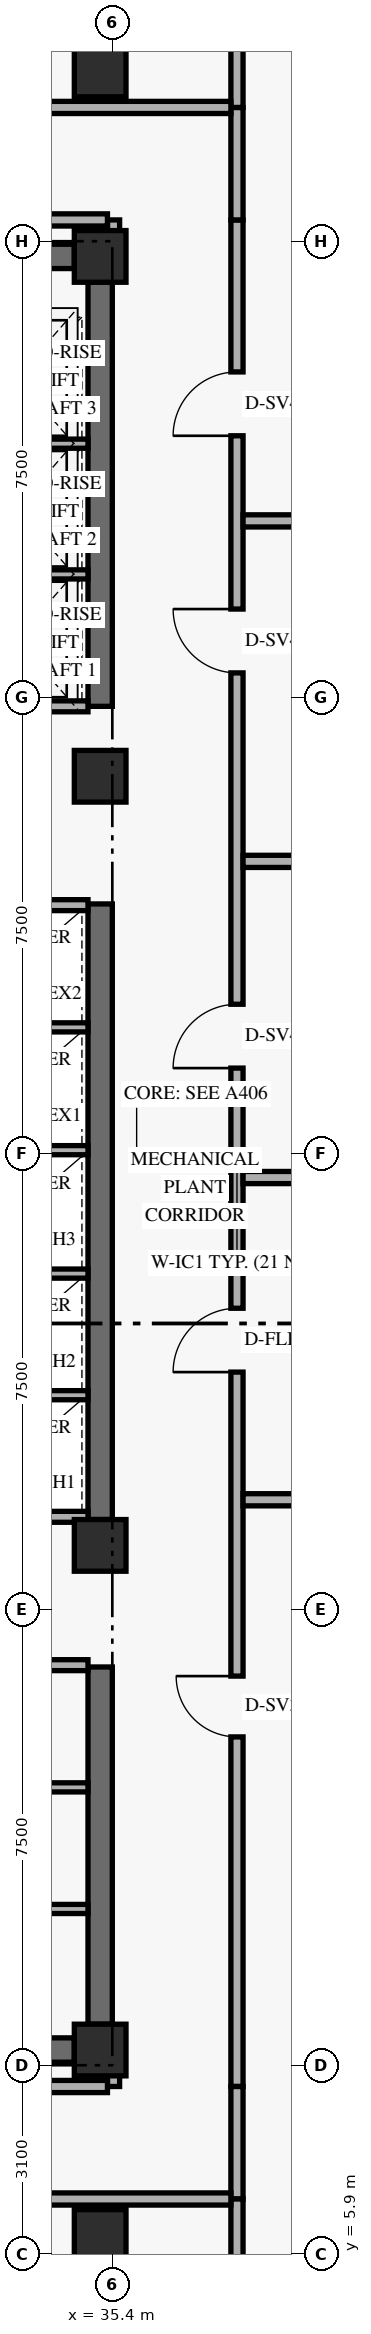
"""IFC4 building model, lengths in metres.
Left out: names, types, materials, properties, quantities, classifications, styles, units other than length and angle.
Written with IfcOpenShell. Run it as: python <this file> out.ifc"""

import sys

from ifc_helpers import new_model, si_unit, direction, frame, frame_2d, origin, origin_2d, place, context, subcontext, project, spatial, rectangle, extrude, element, fill, save


model = new_model("IFC4")
c1 = context("Model", 3, precision=1e-05, world=origin(), true_north=direction((0.0, 1.0)))
c2 = subcontext(c1, "Body", "Model", "MODEL_VIEW")
j1 = project(units=[si_unit("LENGTHUNIT", "METRE"), si_unit("PLANEANGLEUNIT", "RADIAN")], contexts=[c1])
p1 = place(None, origin())
s1 = spatial("IfcSite", under=j1, at=p1, CompositionType="ELEMENT")
p2 = place(p1, origin())
s2 = spatial("IfcBuilding", under=s1, at=p2, CompositionType="ELEMENT")
p3 = place(p2, frame((0.0, 0.0, 135.6)))
s3 = spatial("IfcBuildingStorey", under=s2, at=p3, CompositionType="ELEMENT", Elevation=135.6)
p4 = place(p3, frame((35.2, 9.675, 0.0), z_axis=(0.0, 0.0, 1.0), x_axis=(0.0, 1.0, 0.0)))
e1 = element("IfcWall", 1, at=p4, inside=s3, PredefinedType="SHEAR", context=c2, shape_type="SweptSolid", body=[
    extrude(rectangle(XDim=5.875, YDim=0.4, at=frame_2d((2.938, 0.0))), origin(), (0.0, 0.0, 1.0), 4.549),
])
p5 = place(p3, frame((35.2, 17.975, 0.0), z_axis=(0.0, 0.0, 1.0), x_axis=(0.0, 1.0, 0.0)))
e2 = element("IfcWall", 2, at=p5, inside=s3, PredefinedType="SHEAR", context=c2, shape_type="SweptSolid", body=[
    extrude(rectangle(XDim=10.125, YDim=0.4, at=frame_2d((5.062, 0.0))), origin(), (0.0, 0.0, 1.0), 4.549),
])
p6 = place(p3, frame((35.2, 31.35, 0.0), z_axis=(0.0, 0.0, 1.0), x_axis=(0.0, 1.0, 0.0)))
e3 = element("IfcWall", 3, at=p6, inside=s3, PredefinedType="SHEAR", context=c2, shape_type="SweptSolid", body=[
    extrude(rectangle(XDim=6.975, YDim=0.4, at=frame_2d((3.487, 0.0))), origin(), (0.0, 0.0, 1.0), 4.549),
])
for number, where, z_axis, x_axis in (
    (4, (24.625, 9.25, 0.0), (0.0, 0.0, 1.0), (1.0, 0.0, 0.0)),
    (5, (24.625, 38.75, 0.0), (0.0, 0.0, 1.0), (1.0, 0.0, 0.0)),
):
    element("IfcWall", number, at=place(p3, frame(where, z_axis=z_axis, x_axis=x_axis)), inside=s3, PredefinedType="SHEAR", context=c2, shape_type="SweptSolid", body=[
        extrude(rectangle(XDim=10.15, YDim=0.4, at=frame_2d((5.075, 0.0))), origin(), (0.0, 0.0, 1.0), 5.16),
    ])
for number, where, z_axis, x_axis in (
    (6, (35.2, 6.2, 0.0), (0.0, 0.0, 1.0), (1.0, 0.0, 0.0)),
    (7, (35.2, 9.25, 0.0), (0.0, 0.0, 1.0), (1.0, 0.0, 0.0)),
    (8, (35.2, 17.55, 0.0), (0.0, 0.0, 1.0), (1.0, 0.0, 0.0)),
    (9, (35.2, 30.2, 0.0), (0.0, 0.0, 1.0), (1.0, 0.0, 0.0)),
    (10, (35.2, 38.75, 0.0), (0.0, 0.0, 1.0), (1.0, 0.0, 0.0)),
    (11, (35.2, 41.8, 0.0), (0.0, 0.0, 1.0), (1.0, 0.0, 0.0)),
):
    element("IfcColumn", number, at=place(p3, frame(where, z_axis=z_axis, x_axis=x_axis)), inside=s3, PredefinedType="COLUMN", context=c2, shape_type="SweptSolid", body=[
        extrude(rectangle(XDim=0.85, YDim=0.85, at=origin_2d()), origin(), (0.0, 0.0, 1.0), 5.4),
    ])
p7 = place(p3, frame((32.74, 15.58, 0.0), z_axis=(0.0, 0.0, 1.0), x_axis=(1.0, 0.0, 0.0)))
e12 = element("IfcWall", 12, at=p7, inside=s3, PredefinedType="STANDARD", context=c2, shape_type="SweptSolid", body=[
    extrude(rectangle(XDim=2.26, YDim=0.18, at=frame_2d((1.13, 0.0))), origin(), (0.0, 0.0, 1.0), 5.16),
])
for number, where, z_axis, x_axis in (
    (13, (32.74, 11.57, 0.0), (0.0, 0.0, 1.0), (1.0, 0.0, 0.0)),
    (14, (32.74, 13.57, 0.0), (0.0, 0.0, 1.0), (1.0, 0.0, 0.0)),
):
    element("IfcWall", number, at=place(p3, frame(where, z_axis=z_axis, x_axis=x_axis)), inside=s3, PredefinedType="STANDARD", context=c2, shape_type="SweptSolid", body=[
        extrude(rectangle(XDim=2.26, YDim=0.15, at=frame_2d((1.13, 0.0))), origin(), (0.0, 0.0, 1.0), 5.16),
    ])
for number, where, z_axis, x_axis in (
    (15, (32.74, 18.02, 0.0), (0.0, 0.0, 1.0), (1.0, 0.0, 0.0)),
    (16, (32.74, 28.08, 0.0), (0.0, 0.0, 1.0), (1.0, 0.0, 0.0)),
):
    element("IfcWall", number, at=place(p3, frame(where, z_axis=z_axis, x_axis=x_axis)), inside=s3, PredefinedType="STANDARD", context=c2, shape_type="SweptSolid", body=[
        extrude(rectangle(XDim=2.26, YDim=0.18, at=frame_2d((1.13, 0.0))), origin(), (0.0, 0.0, 1.0), 5.16),
    ])
for number, where, z_axis, x_axis in (
    (17, (32.74, 20.02, 0.0), (0.0, 0.0, 1.0), (1.0, 0.0, 0.0)),
    (18, (32.74, 22.02, 0.0), (0.0, 0.0, 1.0), (1.0, 0.0, 0.0)),
    (19, (32.74, 24.05, 0.0), (0.0, 0.0, 1.0), (1.0, 0.0, 0.0)),
    (20, (32.74, 26.07, 0.0), (0.0, 0.0, 1.0), (1.0, 0.0, 0.0)),
):
    element("IfcWall", number, at=place(p3, frame(where, z_axis=z_axis, x_axis=x_axis)), inside=s3, PredefinedType="STANDARD", context=c2, shape_type="SweptSolid", body=[
        extrude(rectangle(XDim=2.26, YDim=0.15, at=frame_2d((1.13, 0.0))), origin(), (0.0, 0.0, 1.0), 5.16),
    ])
p8 = place(p3, frame((32.74, 31.35, 0.0), z_axis=(0.0, 0.0, 1.0), x_axis=(1.0, 0.0, 0.0)))
e21 = element("IfcWall", 21, at=p8, inside=s3, PredefinedType="STANDARD", context=c2, shape_type="SweptSolid", body=[
    extrude(rectangle(XDim=2.26, YDim=0.18, at=frame_2d((1.13, 0.0))), origin(), (0.0, 0.0, 1.0), 5.16),
])
for number, where, z_axis, x_axis in (
    (22, (32.74, 33.52, 0.0), (0.0, 0.0, 1.0), (1.0, 0.0, 0.0)),
    (23, (32.74, 35.67, 0.0), (0.0, 0.0, 1.0), (1.0, 0.0, 0.0)),
):
    element("IfcWall", number, at=place(p3, frame(where, z_axis=z_axis, x_axis=x_axis)), inside=s3, PredefinedType="STANDARD", context=c2, shape_type="SweptSolid", body=[
        extrude(rectangle(XDim=2.26, YDim=0.15, at=frame_2d((1.13, 0.0))), origin(), (0.0, 0.0, 1.0), 5.16),
    ])
p9 = place(p3, frame((37.45, 8.65, 0.0), z_axis=(0.0, 0.0, 1.0), x_axis=(0.0, 1.0, 0.0)))
e24 = element("IfcWall", 24, at=p9, inside=s3, PredefinedType="STANDARD", context=c2, shape_type="SweptSolid", body=[
    extrude(rectangle(XDim=30.7, YDim=0.2, at=frame_2d((15.35, 0.0))), origin(), (0.0, 0.0, 1.0), 4.531),
])
p10 = place(p9, frame((11.75, 0.0, 0.0)))
e25 = element("IfcOpeningElement", 25, at=p10, cuts=e24, PredefinedType="OPENING", context=c2, shape_type="SweptSolid", body=[
    extrude(rectangle(XDim=1.05, YDim=2.15, at=frame_2d((0.525, 1.075))), frame((0.0, 0.11, 0.0), z_axis=(0.0, -1.0, 0.0), x_axis=(1.0, 0.0, 0.0)), (0.0, 0.0, 1.0), 0.22),
])
p11 = place(p9, frame((5.75, 0.0, 0.0)))
e26 = element("IfcOpeningElement", 26, at=p11, cuts=e24, PredefinedType="OPENING", context=c2, shape_type="SweptSolid", body=[
    extrude(rectangle(XDim=1.0, YDim=2.15, at=frame_2d((0.5, 1.075))), frame((0.0, 0.11, 0.0), z_axis=(0.0, -1.0, 0.0), x_axis=(1.0, 0.0, 0.0)), (0.0, 0.0, 1.0), 0.22),
])
p12 = place(p9, frame((16.75, 0.0, 0.0)))
e27 = element("IfcOpeningElement", 27, at=p12, cuts=e24, PredefinedType="OPENING", context=c2, shape_type="SweptSolid", body=[
    extrude(rectangle(XDim=1.05, YDim=2.15, at=frame_2d((0.525, 1.075))), frame((0.0, 0.11, 0.0), z_axis=(0.0, -1.0, 0.0), x_axis=(1.0, 0.0, 0.0)), (0.0, 0.0, 1.0), 0.22),
])
p13 = place(p9, frame((23.25, 0.0, 0.0)))
e28 = element("IfcOpeningElement", 28, at=p13, cuts=e24, PredefinedType="OPENING", context=c2, shape_type="SweptSolid", body=[
    extrude(rectangle(XDim=1.05, YDim=2.15, at=frame_2d((0.525, 1.075))), frame((0.0, 0.11, 0.0), z_axis=(0.0, -1.0, 0.0), x_axis=(1.0, 0.0, 0.0)), (0.0, 0.0, 1.0), 0.22),
])
p14 = place(p9, frame((27.15, 0.0, 0.0)))
e29 = element("IfcOpeningElement", 29, at=p14, cuts=e24, PredefinedType="OPENING", context=c2, shape_type="SweptSolid", body=[
    extrude(rectangle(XDim=1.05, YDim=2.15, at=frame_2d((0.525, 1.075))), frame((0.0, 0.11, 0.0), z_axis=(0.0, -1.0, 0.0), x_axis=(1.0, 0.0, 0.0)), (0.0, 0.0, 1.0), 0.22),
])
for number, where, z_axis, x_axis in (
    (30, (37.45, 6.8, 0.0), (0.0, 0.0, 1.0), (0.0, 1.0, 0.0)),
    (31, (37.45, 39.35, 0.0), (0.0, 0.0, 1.0), (0.0, 1.0, 0.0)),
):
    element("IfcWall", number, at=place(p3, frame(where, z_axis=z_axis, x_axis=x_axis)), inside=s3, PredefinedType="STANDARD", context=c2, shape_type="SweptSolid", body=[
        extrude(rectangle(XDim=1.85, YDim=0.2, at=frame_2d((0.925, 0.0))), origin(), (0.0, 0.0, 1.0), 5.16),
    ])
for number, where, z_axis, x_axis in (
    (32, (37.45, 3.01, 0.0), (0.0, 0.0, 1.0), (0.0, 1.0, 0.0)),
    (33, (37.45, 41.2, 0.0), (0.0, 0.0, 1.0), (0.0, 1.0, 0.0)),
):
    element("IfcWall", number, at=place(p3, frame(where, z_axis=z_axis, x_axis=x_axis)), inside=s3, PredefinedType="STANDARD", context=c2, shape_type="SweptSolid", body=[
        extrude(rectangle(XDim=3.79, YDim=0.2, at=frame_2d((1.895, 0.0))), origin(), (0.0, 0.0, 1.0), 4.609),
    ])
p15 = place(p3, frame((35.42, 3.01, 0.0), z_axis=(0.0, 0.0, 1.0), x_axis=(0.0, 1.0, 0.0)))
e34 = element("IfcWall", 34, at=p15, inside=s3, PredefinedType="STANDARD", context=c2, shape_type="SweptSolid", body=[
    extrude(rectangle(XDim=3.79, YDim=0.2, at=frame_2d((1.895, 0.0))), origin(), (0.0, 0.0, 1.0), 4.531),
])
for number, where, z_axis, x_axis in (
    (35, (35.42, 8.65, 0.0), (0.0, 0.0, 1.0), (0.0, 1.0, 0.0)),
    (36, (35.42, 38.75, 0.0), (0.0, 0.0, 1.0), (0.0, 1.0, 0.0)),
):
    element("IfcWall", number, at=place(p3, frame(where, z_axis=z_axis, x_axis=x_axis)), inside=s3, PredefinedType="STANDARD", context=c2, shape_type="SweptSolid", body=[
        extrude(rectangle(XDim=0.6, YDim=0.2, at=frame_2d((0.3, 0.0))), origin(), (0.0, 0.0, 1.0), 4.531),
    ])
p16 = place(p3, frame((35.42, 41.2, 0.0), z_axis=(0.0, 0.0, 1.0), x_axis=(0.0, 1.0, 0.0)))
e37 = element("IfcWall", 37, at=p16, inside=s3, PredefinedType="STANDARD", context=c2, shape_type="SweptSolid", body=[
    extrude(rectangle(XDim=3.79, YDim=0.2, at=frame_2d((1.895, 0.0))), origin(), (0.0, 0.0, 1.0), 4.531),
])
for number, where, z_axis, x_axis in (
    (38, (37.55, 18.3, 0.0), (0.0, 0.0, 1.0), (1.0, 0.0, 0.0)),
    (39, (37.55, 23.6, 0.0), (0.0, 0.0, 1.0), (1.0, 0.0, 0.0)),
):
    element("IfcWall", number, at=place(p3, frame(where, z_axis=z_axis, x_axis=x_axis)), inside=s3, PredefinedType="STANDARD", context=c2, shape_type="SweptSolid", body=[
        extrude(rectangle(XDim=5.65, YDim=0.2, at=frame_2d((2.825, 0.0))), origin(), (0.0, 0.0, 1.0), 5.16),
    ])
for number, where, z_axis, x_axis in (
    (40, (37.55, 28.8, 0.0), (0.0, 0.0, 1.0), (1.0, 0.0, 0.0)),
    (41, (37.55, 34.4, 0.0), (0.0, 0.0, 1.0), (1.0, 0.0, 0.0)),
):
    element("IfcWall", number, at=place(p3, frame(where, z_axis=z_axis, x_axis=x_axis)), inside=s3, PredefinedType="STANDARD", context=c2, shape_type="SweptSolid", body=[
        extrude(rectangle(XDim=15.74, YDim=0.2, at=frame_2d((7.87, 0.0))), origin(), (0.0, 0.0, 1.0), 4.531),
    ])
p17 = place(p3, frame((21.75, 6.8, 0.0), z_axis=(0.0, 0.0, 1.0), x_axis=(1.0, 0.0, 0.0)))
e42 = element("IfcWall", 42, at=p17, inside=s3, PredefinedType="STANDARD", context=c2, shape_type="SweptSolid", body=[
    extrude(rectangle(XDim=15.6, YDim=0.2, at=frame_2d((7.8, 0.0))), origin(), (0.0, 0.0, 1.0), 4.531),
])
p18 = place(p17, frame((5.1, 0.0, 0.0)))
e43 = element("IfcOpeningElement", 43, at=p18, cuts=e42, PredefinedType="OPENING", context=c2, shape_type="SweptSolid", body=[
    extrude(rectangle(XDim=0.9, YDim=2.1, at=frame_2d((0.45, 1.05))), frame((0.0, 0.11, 0.0), z_axis=(0.0, -1.0, 0.0), x_axis=(1.0, 0.0, 0.0)), (0.0, 0.0, 1.0), 0.22),
])
p19 = place(p3, frame((21.75, 41.2, 0.0), z_axis=(0.0, 0.0, 1.0), x_axis=(1.0, 0.0, 0.0)))
e44 = element("IfcWall", 44, at=p19, inside=s3, PredefinedType="STANDARD", context=c2, shape_type="SweptSolid", body=[
    extrude(rectangle(XDim=15.6, YDim=0.2, at=frame_2d((7.8, 0.0))), origin(), (0.0, 0.0, 1.0), 4.531),
])
p20 = place(p19, frame((5.1, 0.0, 0.0)))
e45 = element("IfcOpeningElement", 45, at=p20, cuts=e44, PredefinedType="OPENING", context=c2, shape_type="SweptSolid", body=[
    extrude(rectangle(XDim=0.9, YDim=2.1, at=frame_2d((0.45, 1.05))), frame((0.0, 0.11, 0.0), z_axis=(0.0, -1.0, 0.0), x_axis=(1.0, 0.0, 0.0)), (0.0, 0.0, 1.0), 0.22),
])
for number, where, z_axis, x_axis in (
    (46, (23.85, 39.35, 0.0), (0.0, 0.0, 1.0), (1.0, 0.0, 0.0)),
    (47, (23.85, 8.65, 0.0), (0.0, 0.0, 1.0), (1.0, 0.0, 0.0)),
):
    element("IfcWall", number, at=place(p3, frame(where, z_axis=z_axis, x_axis=x_axis)), inside=s3, PredefinedType="STANDARD", context=c2, shape_type="SweptSolid", body=[
        extrude(rectangle(XDim=11.47, YDim=0.2, at=frame_2d((5.735, 0.0))), origin(), (0.0, 0.0, 1.0), 4.531),
    ])
p21 = place(p10, origin())
e48 = element("IfcDoor", 48, at=p21, inside=s3, OperationType="SINGLE_SWING_LEFT", PredefinedType="DOOR", context=c2, shape_type="SweptSolid", body=[
    extrude(rectangle(XDim=1.05, YDim=2.15, at=frame_2d((0.525, 1.075))), frame((0.0, 0.025, 0.0), z_axis=(0.0, -1.0, 0.0), x_axis=(1.0, 0.0, 0.0)), (0.0, 0.0, 1.0), 0.05),
])
fill(e25, e48)
p22 = place(p11, origin())
e49 = element("IfcDoor", 49, at=p22, inside=s3, OperationType="SINGLE_SWING_RIGHT", PredefinedType="DOOR", context=c2, shape_type="SweptSolid", body=[
    extrude(rectangle(XDim=1.0, YDim=2.15, at=frame_2d((0.5, 1.075))), frame((0.0, 0.025, 0.0), z_axis=(0.0, -1.0, 0.0), x_axis=(1.0, 0.0, 0.0)), (0.0, 0.0, 1.0), 0.05),
])
fill(e26, e49)
p23 = place(p12, origin())
e50 = element("IfcDoor", 50, at=p23, inside=s3, OperationType="SINGLE_SWING_LEFT", PredefinedType="DOOR", context=c2, shape_type="SweptSolid", body=[
    extrude(rectangle(XDim=1.05, YDim=2.15, at=frame_2d((0.525, 1.075))), frame((0.0, 0.025, 0.0), z_axis=(0.0, -1.0, 0.0), x_axis=(1.0, 0.0, 0.0)), (0.0, 0.0, 1.0), 0.05),
])
fill(e27, e50)
p24 = place(p13, origin())
e51 = element("IfcDoor", 51, at=p24, inside=s3, OperationType="SINGLE_SWING_RIGHT", PredefinedType="DOOR", context=c2, shape_type="SweptSolid", body=[
    extrude(rectangle(XDim=1.05, YDim=2.15, at=frame_2d((0.525, 1.075))), frame((0.0, 0.025, 0.0), z_axis=(0.0, -1.0, 0.0), x_axis=(1.0, 0.0, 0.0)), (0.0, 0.0, 1.0), 0.05),
])
fill(e28, e51)
p25 = place(p14, origin())
e52 = element("IfcDoor", 52, at=p25, inside=s3, OperationType="SINGLE_SWING_LEFT", PredefinedType="DOOR", context=c2, shape_type="SweptSolid", body=[
    extrude(rectangle(XDim=1.05, YDim=2.15, at=frame_2d((0.525, 1.075))), frame((0.0, 0.025, 0.0), z_axis=(0.0, -1.0, 0.0), x_axis=(1.0, 0.0, 0.0)), (0.0, 0.0, 1.0), 0.05),
])
fill(e29, e52)
save(model, sys.argv[1])
